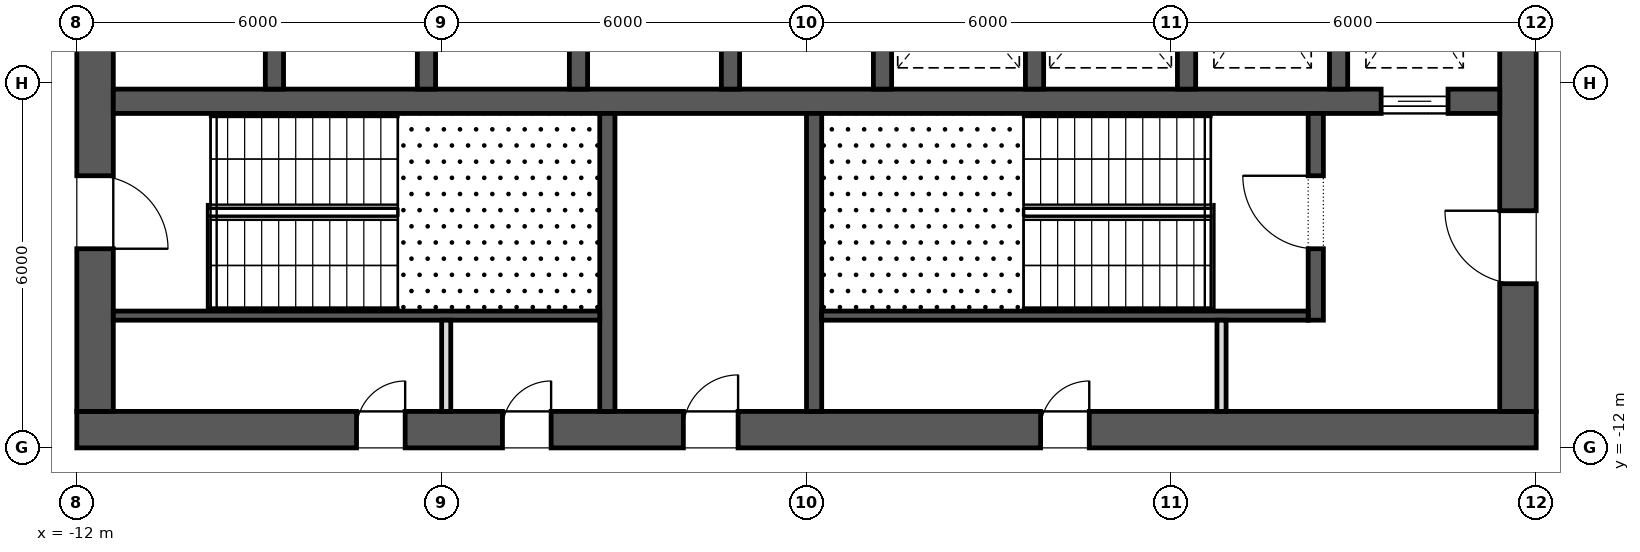
"""IFC4 building model, lengths in metres.
Left out: names, types, materials, properties, quantities, classifications, styles, units other than length and angle.
Written with IfcOpenShell. Run it as: python <this file> out.ifc"""

import sys

from ifc_helpers import new_model, si_unit, direction, frame, frame_2d, origin, place, context, subcontext, project, spatial, rectangle, extrude, element, fill, save


model = new_model("IFC4")
c1 = context("Model", 3, precision=1e-05, world=origin(), true_north=direction((0.0, 1.0)))
c2 = subcontext(c1, "Body", "Model", "MODEL_VIEW")
j1 = project(units=[si_unit("LENGTHUNIT", "METRE"), si_unit("PLANEANGLEUNIT", "RADIAN")], contexts=[c1])
p1 = place(None, origin())
s1 = spatial("IfcSite", under=j1, at=p1, CompositionType="ELEMENT")
p2 = place(p1, origin())
s2 = spatial("IfcBuilding", under=s1, at=p2, CompositionType="ELEMENT")
p3 = place(p2, frame((0.0, 0.0, 57.1)))
s3 = spatial("IfcBuildingStorey", under=s2, at=p3, CompositionType="ELEMENT", Elevation=57.1)
p4 = place(p3, frame((-12.0, -11.7, 0.0), z_axis=(0.0, 0.0, 1.0), x_axis=(1.0, 0.0, 0.0)))
e1 = element("IfcWall", 1, at=p4, inside=s3, PredefinedType="SHEAR", context=c2, shape_type="SweptSolid", body=[
    extrude(rectangle(XDim=24.0, YDim=0.6, at=frame_2d((12.0, 0.0))), origin(), (0.0, 0.0, 1.0), 4.2),
])
p5 = place(p4, frame((9.975, 0.0, 0.0)))
e2 = element("IfcOpeningElement", 2, at=p5, cuts=e1, PredefinedType="OPENING", context=c2, shape_type="SweptSolid", body=[
    extrude(rectangle(XDim=0.9, YDim=2.1, at=frame_2d((0.45, 1.05))), frame((0.0, 0.312, 0.0), z_axis=(0.0, -1.0, 0.0), x_axis=(1.0, 0.0, 0.0)), (0.0, 0.0, 1.0), 0.624),
])
p6 = place(p4, frame((4.6, 0.0, 0.0)))
e3 = element("IfcOpeningElement", 3, at=p6, cuts=e1, PredefinedType="OPENING", context=c2, shape_type="SweptSolid", body=[
    extrude(rectangle(XDim=0.8, YDim=2.1, at=frame_2d((0.4, 1.05))), frame((0.0, 0.312, 0.0), z_axis=(0.0, -1.0, 0.0), x_axis=(1.0, 0.0, 0.0)), (0.0, 0.0, 1.0), 0.624),
])
p7 = place(p4, frame((7.0, 0.0, 0.0)))
e4 = element("IfcOpeningElement", 4, at=p7, cuts=e1, PredefinedType="OPENING", context=c2, shape_type="SweptSolid", body=[
    extrude(rectangle(XDim=0.8, YDim=2.1, at=frame_2d((0.4, 1.05))), frame((0.0, 0.312, 0.0), z_axis=(0.0, -1.0, 0.0), x_axis=(1.0, 0.0, 0.0)), (0.0, 0.0, 1.0), 0.624),
])
p8 = place(p4, frame((15.85, 0.0, 0.0)))
e5 = element("IfcOpeningElement", 5, at=p8, cuts=e1, PredefinedType="OPENING", context=c2, shape_type="SweptSolid", body=[
    extrude(rectangle(XDim=0.8, YDim=2.1, at=frame_2d((0.4, 1.05))), frame((0.0, 0.312, 0.0), z_axis=(0.0, -1.0, 0.0), x_axis=(1.0, 0.0, 0.0)), (0.0, 0.0, 1.0), 0.624),
])
p9 = place(p3, frame((11.7, -11.4, 0.0), z_axis=(0.0, 0.0, 1.0), x_axis=(0.0, 1.0, 0.0)))
e6 = element("IfcWall", 6, at=p9, inside=s3, PredefinedType="SHEAR", context=c2, shape_type="SweptSolid", body=[
    extrude(rectangle(XDim=22.8, YDim=0.6, at=frame_2d((11.4, 0.0))), origin(), (0.0, 0.0, 1.0), 4.2),
])
p10 = place(p9, frame((10.2, 0.0, 0.0)))
e7 = element("IfcOpeningElement", 7, at=p10, cuts=e6, PredefinedType="OPENING", context=c2, shape_type="SweptSolid", body=[
    extrude(rectangle(XDim=2.4, YDim=2.1, at=frame_2d((1.2, 1.05))), frame((0.0, 0.312, 0.0), z_axis=(0.0, -1.0, 0.0), x_axis=(1.0, 0.0, 0.0)), (0.0, 0.0, 1.0), 0.624),
])
p11 = place(p9, frame((19.5, 0.0, 0.0)))
e8 = element("IfcOpeningElement", 8, at=p11, cuts=e6, PredefinedType="OPENING", context=c2, shape_type="SweptSolid", body=[
    extrude(rectangle(XDim=1.2, YDim=2.1, at=frame_2d((0.6, 1.05))), frame((0.0, 0.312, 0.0), z_axis=(0.0, -1.0, 0.0), x_axis=(1.0, 0.0, 0.0)), (0.0, 0.0, 1.0), 0.624),
])
p12 = place(p9, frame((2.1, 0.0, 0.0)))
e9 = element("IfcOpeningElement", 9, at=p12, cuts=e6, PredefinedType="OPENING", context=c2, shape_type="SweptSolid", body=[
    extrude(rectangle(XDim=1.2, YDim=2.1, at=frame_2d((0.6, 1.05))), frame((0.0, 0.312, 0.0), z_axis=(0.0, -1.0, 0.0), x_axis=(1.0, 0.0, 0.0)), (0.0, 0.0, 1.0), 0.624),
])
p13 = place(p3, frame((-11.7, -11.4, 0.0), z_axis=(0.0, 0.0, 1.0), x_axis=(0.0, 1.0, 0.0)))
e10 = element("IfcWall", 10, at=p13, inside=s3, PredefinedType="SHEAR", context=c2, shape_type="SweptSolid", body=[
    extrude(rectangle(XDim=22.8, YDim=0.6, at=frame_2d((11.4, 0.0))), origin(), (0.0, 0.0, 1.0), 4.2),
])
p14 = place(p13, frame((10.2, 0.0, 0.0)))
e11 = element("IfcOpeningElement", 11, at=p14, cuts=e10, PredefinedType="OPENING", context=c2, shape_type="SweptSolid", body=[
    extrude(rectangle(XDim=2.4, YDim=2.1, at=frame_2d((1.2, 1.05))), frame((0.0, 0.312, 0.0), z_axis=(0.0, -1.0, 0.0), x_axis=(1.0, 0.0, 0.0)), (0.0, 0.0, 1.0), 0.624),
])
p15 = place(p13, frame((18.925, 0.0, 0.0)))
e12 = element("IfcOpeningElement", 12, at=p15, cuts=e10, PredefinedType="OPENING", context=c2, shape_type="SweptSolid", body=[
    extrude(rectangle(XDim=1.2, YDim=2.1, at=frame_2d((0.6, 1.05))), frame((0.0, 0.312, 0.0), z_axis=(0.0, -1.0, 0.0), x_axis=(1.0, 0.0, 0.0)), (0.0, 0.0, 1.0), 0.624),
])
p16 = place(p13, frame((2.675, 0.0, 0.0)))
e13 = element("IfcOpeningElement", 13, at=p16, cuts=e10, PredefinedType="OPENING", context=c2, shape_type="SweptSolid", body=[
    extrude(rectangle(XDim=1.2, YDim=2.1, at=frame_2d((0.6, 1.05))), frame((0.0, 0.312, 0.0), z_axis=(0.0, -1.0, 0.0), x_axis=(1.0, 0.0, 0.0)), (0.0, 0.0, 1.0), 0.624),
])
p17 = place(p3, frame((-11.4, -6.3, 0.0), z_axis=(0.0, 0.0, 1.0), x_axis=(1.0, 0.0, 0.0)))
e14 = element("IfcWall", 14, at=p17, inside=s3, PredefinedType="SHEAR", context=c2, shape_type="SweptSolid", body=[
    extrude(rectangle(XDim=22.8, YDim=0.4, at=frame_2d((11.4, 0.0))), origin(), (0.0, 0.0, 1.0), 4.2),
])
p18 = place(p17, frame((20.85, 0.0, 0.0)))
e15 = element("IfcOpeningElement", 15, at=p18, cuts=e14, PredefinedType="OPENING", context=c2, shape_type="SweptSolid", body=[
    extrude(rectangle(XDim=1.1, YDim=2.1, at=frame_2d((0.55, 1.05))), frame((0.0, 0.212, 0.0), z_axis=(0.0, -1.0, 0.0), x_axis=(1.0, 0.0, 0.0)), (0.0, 0.0, 1.0), 0.424),
])
for number, where, z_axis, x_axis in (
    (16, (-8.75, -6.1, 0.0), (0.0, 0.0, 1.0), (0.0, 1.0, 0.0)),
    (17, (-6.25, -6.1, 0.0), (0.0, 0.0, 1.0), (0.0, 1.0, 0.0)),
    (18, (-3.75, -6.1, 0.0), (0.0, 0.0, 1.0), (0.0, 1.0, 0.0)),
    (19, (-1.25, -6.1, 0.0), (0.0, 0.0, 1.0), (0.0, 1.0, 0.0)),
    (20, (1.25, -6.1, 0.0), (0.0, 0.0, 1.0), (0.0, 1.0, 0.0)),
    (21, (3.75, -6.1, 0.0), (0.0, 0.0, 1.0), (0.0, 1.0, 0.0)),
    (22, (6.25, -6.1, 0.0), (0.0, 0.0, 1.0), (0.0, 1.0, 0.0)),
    (23, (8.75, -6.1, 0.0), (0.0, 0.0, 1.0), (0.0, 1.0, 0.0)),
):
    element("IfcWall", number, at=place(p3, frame(where, z_axis=z_axis, x_axis=x_axis)), inside=s3, PredefinedType="SHEAR", context=c2, shape_type="SweptSolid", body=[
        extrude(rectangle(XDim=2.9, YDim=0.3, at=frame_2d((1.45, 0.0))), origin(), (0.0, 0.0, 1.0), 4.2),
    ])
for number, where, z_axis, x_axis in (
    (24, (-3.275, -11.4, 0.0), (0.0, 0.0, 1.0), (0.0, 1.0, 0.0)),
    (25, (0.125, -11.4, 0.0), (0.0, 0.0, 1.0), (0.0, 1.0, 0.0)),
):
    element("IfcWall", number, at=place(p3, frame(where, z_axis=z_axis, x_axis=x_axis)), inside=s3, PredefinedType="SHEAR", context=c2, shape_type="SweptSolid", body=[
        extrude(rectangle(XDim=4.9, YDim=0.25, at=frame_2d((2.45, 0.0))), origin(), (0.0, 0.0, 1.0), 3.9),
    ])
p19 = place(p3, frame((8.375, -9.9, 0.0), z_axis=(0.0, 0.0, 1.0), x_axis=(0.0, 1.0, 0.0)))
e26 = element("IfcWall", 26, at=p19, inside=s3, PredefinedType="SHEAR", context=c2, shape_type="SweptSolid", body=[
    extrude(rectangle(XDim=3.4, YDim=0.25, at=frame_2d((1.7, 0.0))), origin(), (0.0, 0.0, 1.0), 3.9),
])
p20 = place(p19, frame((1.175, 0.0, 0.0)))
e27 = element("IfcOpeningElement", 27, at=p20, cuts=e26, PredefinedType="OPENING", context=c2, shape_type="SweptSolid", body=[
    extrude(rectangle(XDim=1.2, YDim=2.1, at=frame_2d((0.6, 1.05))), frame((0.0, 0.137, 0.0), z_axis=(0.0, -1.0, 0.0), x_axis=(1.0, 0.0, 0.0)), (0.0, 0.0, 1.0), 0.274),
])
for number, where, z_axis, x_axis in (
    (28, (-11.4, -9.825, 0.0), (0.0, 0.0, 1.0), (1.0, 0.0, 0.0)),
    (29, (0.25, -9.825, 0.0), (0.0, 0.0, 1.0), (1.0, 0.0, 0.0)),
):
    element("IfcWall", number, at=place(p3, frame(where, z_axis=z_axis, x_axis=x_axis)), inside=s3, PredefinedType="SHEAR", context=c2, shape_type="SweptSolid", body=[
        extrude(rectangle(XDim=8.0, YDim=0.15, at=frame_2d((4.0, 0.0))), origin(), (0.0, 0.0, 1.0), 3.9),
    ])
for number, where, z_axis, x_axis in (
    (30, (-5.925, -11.4, 0.0), (0.0, 0.0, 1.0), (0.0, 1.0, 0.0)),
    (31, (6.825, -11.4, 0.0), (0.0, 0.0, 1.0), (0.0, 1.0, 0.0)),
):
    element("IfcWall", number, at=place(p3, frame(where, z_axis=z_axis, x_axis=x_axis)), inside=s3, PredefinedType="PARTITIONING", context=c2, shape_type="SweptSolid", body=[
        extrude(rectangle(XDim=1.5, YDim=0.15, at=frame_2d((0.75, 0.0))), origin(), (0.0, 0.0, 1.0), 3.9),
    ])
p21 = place(p18, origin())
e32 = element("IfcDoor", 32, at=p21, inside=s3, OperationType="SLIDING_TO_LEFT", PredefinedType="DOOR", context=c2, shape_type="SweptSolid", body=[
    extrude(rectangle(XDim=1.1, YDim=2.1, at=frame_2d((0.55, 1.05))), frame((0.0, 0.025, 0.0), z_axis=(0.0, -1.0, 0.0), x_axis=(1.0, 0.0, 0.0)), (0.0, 0.0, 1.0), 0.05),
])
fill(e15, e32)
p22 = place(p16, frame((1.2, 0.0, 0.0), z_axis=(0.0, 0.0, 1.0), x_axis=(-1.0, 0.0, 0.0)))
e33 = element("IfcDoor", 33, at=p22, inside=s3, OperationType="SINGLE_SWING_LEFT", PredefinedType="DOOR", context=c2, shape_type="SweptSolid", body=[
    extrude(rectangle(XDim=1.2, YDim=2.1, at=frame_2d((0.6, 1.05))), frame((0.0, 0.025, 0.0), z_axis=(0.0, -1.0, 0.0), x_axis=(1.0, 0.0, 0.0)), (0.0, 0.0, 1.0), 0.05),
])
fill(e13, e33)
p23 = place(p20, origin())
e34 = element("IfcDoor", 34, at=p23, inside=s3, OperationType="SINGLE_SWING_LEFT", PredefinedType="DOOR", context=c2, shape_type="SweptSolid", body=[
    extrude(rectangle(XDim=1.2, YDim=2.1, at=frame_2d((0.6, 1.05))), frame((0.0, 0.025, 0.0), z_axis=(0.0, -1.0, 0.0), x_axis=(1.0, 0.0, 0.0)), (0.0, 0.0, 1.0), 0.05),
])
fill(e27, e34)
p24 = place(p12, origin())
e35 = element("IfcDoor", 35, at=p24, inside=s3, OperationType="SINGLE_SWING_LEFT", PredefinedType="DOOR", context=c2, shape_type="SweptSolid", body=[
    extrude(rectangle(XDim=1.2, YDim=2.1, at=frame_2d((0.6, 1.05))), frame((0.0, 0.025, 0.0), z_axis=(0.0, -1.0, 0.0), x_axis=(1.0, 0.0, 0.0)), (0.0, 0.0, 1.0), 0.05),
])
fill(e9, e35)
p25 = place(p5, origin())
e36 = element("IfcDoor", 36, at=p25, inside=s3, OperationType="SINGLE_SWING_LEFT", PredefinedType="DOOR", context=c2, shape_type="SweptSolid", body=[
    extrude(rectangle(XDim=0.9, YDim=2.1, at=frame_2d((0.45, 1.05))), frame((0.0, 0.025, 0.0), z_axis=(0.0, -1.0, 0.0), x_axis=(1.0, 0.0, 0.0)), (0.0, 0.0, 1.0), 0.05),
])
fill(e2, e36)
p26 = place(p6, origin())
e37 = element("IfcDoor", 37, at=p26, inside=s3, OperationType="SINGLE_SWING_LEFT", PredefinedType="DOOR", context=c2, shape_type="SweptSolid", body=[
    extrude(rectangle(XDim=0.8, YDim=2.1, at=frame_2d((0.4, 1.05))), frame((0.0, 0.025, 0.0), z_axis=(0.0, -1.0, 0.0), x_axis=(1.0, 0.0, 0.0)), (0.0, 0.0, 1.0), 0.05),
])
fill(e3, e37)
p27 = place(p7, origin())
e38 = element("IfcDoor", 38, at=p27, inside=s3, OperationType="SINGLE_SWING_LEFT", PredefinedType="DOOR", context=c2, shape_type="SweptSolid", body=[
    extrude(rectangle(XDim=0.8, YDim=2.1, at=frame_2d((0.4, 1.05))), frame((0.0, 0.025, 0.0), z_axis=(0.0, -1.0, 0.0), x_axis=(1.0, 0.0, 0.0)), (0.0, 0.0, 1.0), 0.05),
])
fill(e4, e38)
p28 = place(p8, origin())
e39 = element("IfcDoor", 39, at=p28, inside=s3, OperationType="SINGLE_SWING_LEFT", PredefinedType="DOOR", context=c2, shape_type="SweptSolid", body=[
    extrude(rectangle(XDim=0.8, YDim=2.1, at=frame_2d((0.4, 1.05))), frame((0.0, 0.025, 0.0), z_axis=(0.0, -1.0, 0.0), x_axis=(1.0, 0.0, 0.0)), (0.0, 0.0, 1.0), 0.05),
])
fill(e5, e39)
save(model, sys.argv[1])
